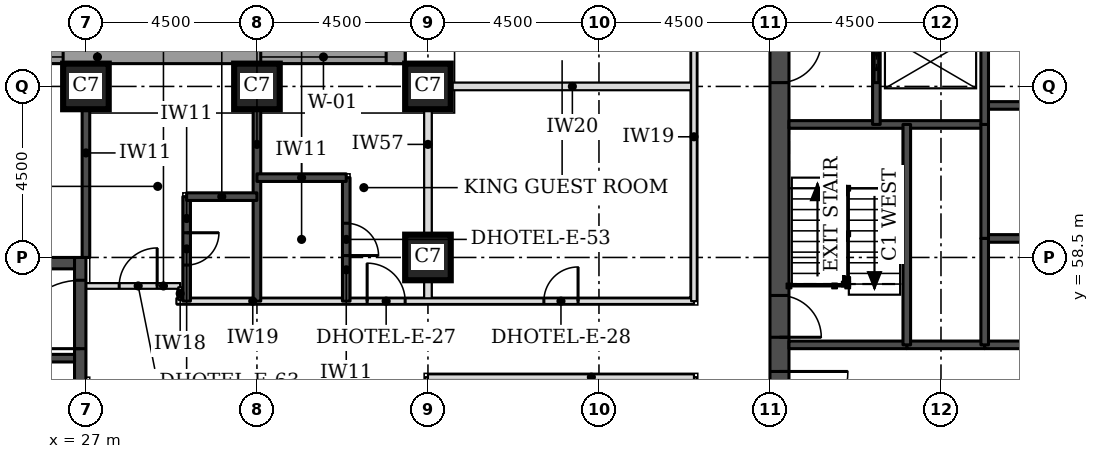
"""IFC4 building model, lengths in metres.
Left out: names, types, materials, properties, quantities, classifications, styles, units other than length and angle.
Written with IfcOpenShell. Run it as: python <this file> out.ifc"""

import sys

from ifc_helpers import new_model, si_unit, direction, frame, frame_2d, origin, origin_2d, place, context, subcontext, project, spatial, rectangle, extrude, element, fill, save


model = new_model("IFC4")
c1 = context("Model", 3, precision=1e-05, world=origin(), true_north=direction((0.0, 1.0)))
c2 = subcontext(c1, "Body", "Model", "MODEL_VIEW")
j1 = project(units=[si_unit("LENGTHUNIT", "METRE"), si_unit("PLANEANGLEUNIT", "RADIAN")], contexts=[c1])
p1 = place(None, origin())
s1 = spatial("IfcSite", under=j1, at=p1, CompositionType="ELEMENT")
p2 = place(p1, origin())
s2 = spatial("IfcBuilding", under=s1, at=p2, CompositionType="ELEMENT")
p3 = place(p2, frame((0.0, 0.0, 39.6)))
s3 = spatial("IfcBuildingStorey", under=s2, at=p3, CompositionType="ELEMENT", Elevation=39.6)
for number, where, z_axis, x_axis in (
    (1, (36.0, 58.5, 0.0), (0.0, 0.0, 1.0), (1.0, 0.0, 0.0)),
    (2, (27.0, 63.0, 0.0), (0.0, 0.0, 1.0), (1.0, 0.0, 0.0)),
    (3, (31.5, 63.0, 0.0), (0.0, 0.0, 1.0), (1.0, 0.0, 0.0)),
    (4, (36.0, 63.0, 0.0), (0.0, 0.0, 1.0), (1.0, 0.0, 0.0)),
):
    element("IfcColumn", number, at=place(p3, frame(where, z_axis=z_axis, x_axis=x_axis)), inside=s3, PredefinedType="COLUMN", context=c2, shape_type="SweptSolid", body=[
        extrude(rectangle(XDim=1.2, YDim=1.2, at=origin_2d()), origin(), (0.0, 0.0, 1.0), 3.3),
    ])
p4 = place(p3, frame((45.25, 49.5, 0.0), z_axis=(0.0, 0.0, 1.0), x_axis=(0.0, 1.0, 0.0)))
e5 = element("IfcWall", 5, at=p4, inside=s3, PredefinedType="SHEAR", context=c2, shape_type="SweptSolid", body=[
    extrude(rectangle(XDim=22.5, YDim=0.5, at=frame_2d((11.25, 0.0))), origin(), (0.0, 0.0, 1.0), 3.3),
])
p5 = place(p4, frame((4.2, 0.0, 0.0)))
e6 = element("IfcOpeningElement", 6, at=p5, cuts=e5, PredefinedType="OPENING", context=c2, shape_type="SweptSolid", body=[
    extrude(rectangle(XDim=1.8, YDim=2.1, at=frame_2d((0.9, 1.05))), frame((0.0, 0.26, 0.0), z_axis=(0.0, -1.0, 0.0), x_axis=(1.0, 0.0, 0.0)), (0.0, 0.0, 1.0), 0.52),
])
p6 = place(p4, frame((6.9, 0.0, 0.0)))
e7 = element("IfcOpeningElement", 7, at=p6, cuts=e5, PredefinedType="OPENING", context=c2, shape_type="SweptSolid", body=[
    extrude(rectangle(XDim=1.1, YDim=2.1, at=frame_2d((0.55, 1.05))), frame((0.0, 0.26, 0.0), z_axis=(0.0, -1.0, 0.0), x_axis=(1.0, 0.0, 0.0)), (0.0, 0.0, 1.0), 0.52),
])
p7 = place(p4, frame((13.6, 0.0, 0.0)))
e8 = element("IfcOpeningElement", 8, at=p7, cuts=e5, PredefinedType="OPENING", context=c2, shape_type="SweptSolid", body=[
    extrude(rectangle(XDim=1.1, YDim=2.1, at=frame_2d((0.55, 1.05))), frame((0.0, 0.26, 0.0), z_axis=(0.0, -1.0, 0.0), x_axis=(1.0, 0.0, 0.0)), (0.0, 0.0, 1.0), 0.52),
])
p8 = place(p4, frame((16.5, 0.0, 0.0)))
e9 = element("IfcOpeningElement", 9, at=p8, cuts=e5, PredefinedType="OPENING", context=c2, shape_type="SweptSolid", body=[
    extrude(rectangle(XDim=1.8, YDim=2.1, at=frame_2d((0.9, 1.05))), frame((0.0, 0.26, 0.0), z_axis=(0.0, -1.0, 0.0), x_axis=(1.0, 0.0, 0.0)), (0.0, 0.0, 1.0), 0.52),
])
p9 = place(p3, frame((18.3, 58.35, 0.0), z_axis=(0.0, 0.0, 1.0), x_axis=(1.0, 0.0, 0.0)))
e10 = element("IfcWall", 10, at=p9, inside=s3, PredefinedType="SHEAR", context=c2, shape_type="SweptSolid", body=[
    extrude(rectangle(XDim=8.4, YDim=0.3, at=frame_2d((4.2, 0.0))), origin(), (0.0, 0.0, 1.0), 3.3),
])
p10 = place(p3, frame((26.85, 49.5, 0.0), z_axis=(0.0, 0.0, 1.0), x_axis=(0.0, 1.0, 0.0)))
e11 = element("IfcWall", 11, at=p10, inside=s3, PredefinedType="SHEAR", context=c2, shape_type="SweptSolid", body=[
    extrude(rectangle(XDim=9.0, YDim=0.3, at=frame_2d((4.5, 0.0))), origin(), (0.0, 0.0, 1.0), 3.3),
])
p11 = place(p10, frame((6.6, 0.0, 0.0)))
e12 = element("IfcOpeningElement", 12, at=p11, cuts=e11, PredefinedType="OPENING", context=c2, shape_type="SweptSolid", body=[
    extrude(rectangle(XDim=1.8, YDim=2.1, at=frame_2d((0.9, 1.05))), frame((0.0, 0.16, 0.0), z_axis=(0.0, -1.0, 0.0), x_axis=(1.0, 0.0, 0.0)), (0.0, 0.0, 1.0), 0.32),
])
p12 = place(p3, frame((35.225, 76.894, 0.0), z_axis=(0.0, 0.0, 1.0), x_axis=(0.0, -1.0, 0.0)))
e13 = element("IfcWall", 13, at=p12, inside=s3, PredefinedType="STANDARD", context=c2, shape_type="SweptSolid", body=[
    extrude(rectangle(XDim=13.293, YDim=0.35, at=frame_2d((6.647, 0.0))), origin(), (0.0, 0.0, 1.0), 3.055),
])
p13 = place(p12, frame((9.493, 0.0, 0.8)))
e14 = element("IfcOpeningElement", 14, at=p13, cuts=e13, PredefinedType="OPENING", context=c2, shape_type="SweptSolid", body=[
    extrude(rectangle(XDim=3.3, YDim=1.5, at=frame_2d((1.65, 0.75))), frame((0.0, 0.185, 0.0), z_axis=(0.0, -1.0, 0.0), x_axis=(1.0, 0.0, 0.0)), (0.0, 0.0, 1.0), 0.37),
])
p14 = place(p3, frame((35.4, 63.775, 0.0), z_axis=(0.0, 0.0, 1.0), x_axis=(-1.0, 0.0, 0.0)))
e15 = element("IfcWall", 15, at=p14, inside=s3, PredefinedType="STANDARD", context=c2, shape_type="SweptSolid", body=[
    extrude(rectangle(XDim=17.793, YDim=0.35, at=frame_2d((8.897, 0.0))), origin(), (0.0, 0.0, 1.0), 3.055),
])
p15 = place(p14, frame((0.5, 0.0, 0.8)))
e16 = element("IfcOpeningElement", 16, at=p15, cuts=e15, PredefinedType="OPENING", context=c2, shape_type="SweptSolid", body=[
    extrude(rectangle(XDim=3.3, YDim=1.5, at=frame_2d((1.65, 0.75))), frame((0.0, 0.185, 0.0), z_axis=(0.0, -1.0, 0.0), x_axis=(1.0, 0.0, 0.0)), (0.0, 0.0, 1.0), 0.37),
])
p16 = place(p14, frame((9.0, 0.0, 0.8)))
e17 = element("IfcOpeningElement", 17, at=p16, cuts=e15, PredefinedType="OPENING", context=c2, shape_type="SweptSolid", body=[
    extrude(rectangle(XDim=3.3, YDim=1.5, at=frame_2d((1.65, 0.75))), frame((0.0, 0.185, 0.0), z_axis=(0.0, -1.0, 0.0), x_axis=(1.0, 0.0, 0.0)), (0.0, 0.0, 1.0), 0.37),
])
p17 = place(p3, frame((36.0, 57.35, 0.0), z_axis=(0.0, 0.0, 1.0), x_axis=(0.0, 1.0, 0.0)))
e18 = element("IfcWall", 18, at=p17, inside=s3, PredefinedType="PARTITIONING", context=c2, shape_type="SweptSolid", body=[
    extrude(rectangle(XDim=5.05, YDim=0.2, at=frame_2d((2.525, 0.0))), origin(), (0.0, 0.0, 1.0), 2.33),
])
p18 = place(p3, frame((36.6, 63.0, 0.0), z_axis=(0.0, 0.0, 1.0), x_axis=(1.0, 0.0, 0.0)))
e19 = element("IfcWall", 19, at=p18, inside=s3, PredefinedType="PARTITIONING", context=c2, shape_type="SweptSolid", body=[
    extrude(rectangle(XDim=6.4, YDim=0.2, at=frame_2d((3.2, 0.0))), origin(), (0.0, 0.0, 1.0), 3.08),
])
p19 = place(p3, frame((43.0, 47.5, 0.0), z_axis=(0.0, 0.0, 1.0), x_axis=(0.0, 1.0, 0.0)))
e20 = element("IfcWall", 20, at=p19, inside=s3, PredefinedType="PARTITIONING", context=c2, shape_type="SweptSolid", body=[
    extrude(rectangle(XDim=7.85, YDim=0.15, at=frame_2d((3.925, 0.0))), origin(), (0.0, 0.0, 1.0), 3.08),
])
p20 = place(p19, frame((3.475, 0.0, 0.0)))
e21 = element("IfcOpeningElement", 21, at=p20, cuts=e20, PredefinedType="OPENING", context=c2, shape_type="SweptSolid", body=[
    extrude(rectangle(XDim=0.9, YDim=2.1, at=frame_2d((0.45, 1.05))), frame((0.0, 0.085, 0.0), z_axis=(0.0, -1.0, 0.0), x_axis=(1.0, 0.0, 0.0)), (0.0, 0.0, 1.0), 0.17),
])
p21 = place(p3, frame((36.0, 54.05, 0.0), z_axis=(0.0, 0.0, 1.0), x_axis=(0.0, 1.0, 0.0)))
e22 = element("IfcWall", 22, at=p21, inside=s3, PredefinedType="PARTITIONING", context=c2, shape_type="SweptSolid", body=[
    extrude(rectangle(XDim=1.3, YDim=0.15, at=frame_2d((0.65, 0.0))), origin(), (0.0, 0.0, 1.0), 2.33),
])
p22 = place(p3, frame((36.0, 55.35, 0.0), z_axis=(0.0, 0.0, 1.0), x_axis=(1.0, 0.0, 0.0)))
e23 = element("IfcWall", 23, at=p22, inside=s3, PredefinedType="PARTITIONING", context=c2, shape_type="SweptSolid", body=[
    extrude(rectangle(XDim=7.0, YDim=0.15, at=frame_2d((3.5, 0.0))), origin(), (0.0, 0.0, 1.0), 3.08),
])
p23 = place(p3, frame((29.38, 57.35, 0.0), z_axis=(0.0, 0.0, 1.0), x_axis=(1.0, 0.0, 0.0)))
e24 = element("IfcWall", 24, at=p23, inside=s3, PredefinedType="PARTITIONING", context=c2, shape_type="SweptSolid", body=[
    extrude(rectangle(XDim=13.62, YDim=0.15, at=frame_2d((6.81, 0.0))), origin(), (0.0, 0.0, 1.0), 3.08),
])
p24 = place(p23, frame((5.02, 0.0, 0.0)))
e25 = element("IfcOpeningElement", 25, at=p24, cuts=e24, PredefinedType="OPENING", context=c2, shape_type="SweptSolid", body=[
    extrude(rectangle(XDim=1.0, YDim=2.1, at=frame_2d((0.5, 1.05))), frame((0.0, 0.085, 0.0), z_axis=(0.0, -1.0, 0.0), x_axis=(1.0, 0.0, 0.0)), (0.0, 0.0, 1.0), 0.17),
])
p25 = place(p23, frame((9.67, 0.0, 0.0)))
e26 = element("IfcOpeningElement", 26, at=p25, cuts=e24, PredefinedType="OPENING", context=c2, shape_type="SweptSolid", body=[
    extrude(rectangle(XDim=0.9, YDim=2.1, at=frame_2d((0.45, 1.05))), frame((0.0, 0.085, 0.0), z_axis=(0.0, -1.0, 0.0), x_axis=(1.0, 0.0, 0.0)), (0.0, 0.0, 1.0), 0.17),
])
p26 = place(p3, frame((43.0, 57.35, 0.0), z_axis=(0.0, 0.0, 1.0), x_axis=(0.0, 1.0, 0.0)))
e27 = element("IfcWall", 27, at=p26, inside=s3, PredefinedType="PARTITIONING", context=c2, shape_type="SweptSolid", body=[
    extrude(rectangle(XDim=16.65, YDim=0.15, at=frame_2d((8.325, 0.0))), origin(), (0.0, 0.0, 1.0), 3.08),
])
p27 = place(p26, frame((8.425, 0.0, 0.0)))
e28 = element("IfcOpeningElement", 28, at=p27, cuts=e27, PredefinedType="OPENING", context=c2, shape_type="SweptSolid", body=[
    extrude(rectangle(XDim=1.0, YDim=2.1, at=frame_2d((0.5, 1.05))), frame((0.0, 0.085, 0.0), z_axis=(0.0, -1.0, 0.0), x_axis=(1.0, 0.0, 0.0)), (0.0, 0.0, 1.0), 0.17),
])
p28 = place(p26, frame((15.203, 0.0, 0.0)))
e29 = element("IfcOpeningElement", 29, at=p28, cuts=e27, PredefinedType="OPENING", context=c2, shape_type="SweptSolid", body=[
    extrude(rectangle(XDim=1.0, YDim=2.1, at=frame_2d((0.5, 1.05))), frame((0.0, 0.085, 0.0), z_axis=(0.0, -1.0, 0.0), x_axis=(1.0, 0.0, 0.0)), (0.0, 0.0, 1.0), 0.17),
])
p29 = place(p3, frame((27.0, 58.5, 0.0), z_axis=(0.0, 0.0, 1.0), x_axis=(0.0, 1.0, 0.0)))
e30 = element("IfcWall", 30, at=p29, inside=s3, PredefinedType="SOLIDWALL", context=c2, shape_type="SweptSolid", body=[
    extrude(rectangle(XDim=3.9, YDim=0.2, at=frame_2d((1.95, 0.0))), origin(), (0.0, 0.0, 1.0), 3.08),
])
p30 = place(p3, frame((29.65, 57.35, 0.0), z_axis=(0.0, 0.0, 1.0), x_axis=(0.0, 1.0, 0.0)))
e31 = element("IfcWall", 31, at=p30, inside=s3, PredefinedType="SOLIDWALL", context=c2, shape_type="SweptSolid", body=[
    extrude(rectangle(XDim=2.75, YDim=0.2, at=frame_2d((1.375, 0.0))), origin(), (0.0, 0.0, 1.0), 3.08),
])
p31 = place(p30, frame((0.95, 0.0, 0.0)))
e32 = element("IfcOpeningElement", 32, at=p31, cuts=e31, PredefinedType="OPENING", context=c2, shape_type="SweptSolid", body=[
    extrude(rectangle(XDim=0.85, YDim=2.1, at=frame_2d((0.425, 1.05))), frame((0.0, 0.11, 0.0), z_axis=(0.0, -1.0, 0.0), x_axis=(1.0, 0.0, 0.0)), (0.0, 0.0, 1.0), 0.22),
])
p32 = place(p3, frame((31.5, 57.35, 0.0), z_axis=(0.0, 0.0, 1.0), x_axis=(0.0, 1.0, 0.0)))
e33 = element("IfcWall", 33, at=p32, inside=s3, PredefinedType="SOLIDWALL", context=c2, shape_type="SweptSolid", body=[
    extrude(rectangle(XDim=5.05, YDim=0.2, at=frame_2d((2.525, 0.0))), origin(), (0.0, 0.0, 1.0), 3.08),
])
p33 = place(p3, frame((33.85, 57.35, 0.0), z_axis=(0.0, 0.0, 1.0), x_axis=(0.0, 1.0, 0.0)))
e34 = element("IfcWall", 34, at=p33, inside=s3, PredefinedType="SOLIDWALL", context=c2, shape_type="SweptSolid", body=[
    extrude(rectangle(XDim=3.25, YDim=0.2, at=frame_2d((1.625, 0.0))), origin(), (0.0, 0.0, 1.0), 3.08),
])
p34 = place(p33, frame((1.2, 0.0, 0.0)))
e35 = element("IfcOpeningElement", 35, at=p34, cuts=e34, PredefinedType="OPENING", context=c2, shape_type="SweptSolid", body=[
    extrude(rectangle(XDim=0.85, YDim=2.1, at=frame_2d((0.425, 1.05))), frame((0.0, 0.11, 0.0), z_axis=(0.0, -1.0, 0.0), x_axis=(1.0, 0.0, 0.0)), (0.0, 0.0, 1.0), 0.22),
])
p35 = place(p3, frame((29.65, 60.1, 0.0), z_axis=(0.0, 0.0, 1.0), x_axis=(1.0, 0.0, 0.0)))
e36 = element("IfcWall", 36, at=p35, inside=s3, PredefinedType="SOLIDWALL", context=c2, shape_type="SweptSolid", body=[
    extrude(rectangle(XDim=1.85, YDim=0.2, at=frame_2d((0.925, 0.0))), origin(), (0.0, 0.0, 1.0), 3.08),
])
p36 = place(p3, frame((31.5, 60.6, 0.0), z_axis=(0.0, 0.0, 1.0), x_axis=(1.0, 0.0, 0.0)))
e37 = element("IfcWall", 37, at=p36, inside=s3, PredefinedType="SOLIDWALL", context=c2, shape_type="SweptSolid", body=[
    extrude(rectangle(XDim=2.35, YDim=0.2, at=frame_2d((1.175, 0.0))), origin(), (0.0, 0.0, 1.0), 3.08),
])
p37 = place(p3, frame((27.0, 57.75, 0.0), z_axis=(0.0, 0.0, 1.0), x_axis=(1.0, 0.0, 0.0)))
e38 = element("IfcWall", 38, at=p37, inside=s3, PredefinedType="PARTITIONING", context=c2, shape_type="SweptSolid", body=[
    extrude(rectangle(XDim=2.48, YDim=0.15, at=frame_2d((1.24, 0.0))), origin(), (0.0, 0.0, 1.0), 3.08),
])
p38 = place(p37, frame((0.875, 0.0, 0.0)))
e39 = element("IfcOpeningElement", 39, at=p38, cuts=e38, PredefinedType="OPENING", context=c2, shape_type="SweptSolid", body=[
    extrude(rectangle(XDim=1.0, YDim=2.1, at=frame_2d((0.5, 1.05))), frame((0.0, 0.085, 0.0), z_axis=(0.0, -1.0, 0.0), x_axis=(1.0, 0.0, 0.0)), (0.0, 0.0, 1.0), 0.17),
])
p39 = place(p3, frame((29.48, 57.385, 0.0), z_axis=(0.0, 0.0, 1.0), x_axis=(0.0, 1.0, 0.0)))
e40 = element("IfcWall", 40, at=p39, inside=s3, PredefinedType="PARTITIONING", context=c2, shape_type="SweptSolid", body=[
    extrude(rectangle(XDim=0.33, YDim=0.1, at=frame_2d((0.165, 0.0))), origin(), (0.0, 0.0, 1.0), 3.08),
])
p40 = place(p3, frame((48.6, 56.2, 0.0), z_axis=(0.0, 0.0, 1.0), x_axis=(1.0, 0.0, 0.0)))
e41 = element("IfcWall", 41, at=p40, inside=s3, PredefinedType="SOLIDWALL", context=c2, shape_type="SweptSolid", body=[
    extrude(rectangle(XDim=2.05, YDim=0.2, at=frame_2d((1.025, 0.0))), origin(), (0.0, 0.0, 1.0), 3.08),
])
p41 = place(p3, frame((45.5, 56.2, 0.0), z_axis=(0.0, 0.0, 1.0), x_axis=(1.0, 0.0, 0.0)))
e42 = element("IfcWall", 42, at=p41, inside=s3, PredefinedType="SOLIDWALL", context=c2, shape_type="SweptSolid", body=[
    extrude(rectangle(XDim=3.1, YDim=0.2, at=frame_2d((1.55, 0.0))), origin(), (0.0, 0.0, 1.0), 3.08),
])
p42 = place(p3, frame((50.65, 56.2, 0.0), z_axis=(0.0, 0.0, 1.0), x_axis=(1.0, 0.0, 0.0)))
e43 = element("IfcWall", 43, at=p42, inside=s3, PredefinedType="SOLIDWALL", context=c2, shape_type="SweptSolid", body=[
    extrude(rectangle(XDim=11.2, YDim=0.2, at=frame_2d((5.6, 0.0))), origin(), (0.0, 0.0, 1.0), 3.08),
])
p43 = place(p3, frame((50.65, 59.0, 0.0), z_axis=(0.0, 0.0, 1.0), x_axis=(1.0, 0.0, 0.0)))
e44 = element("IfcWall", 44, at=p43, inside=s3, PredefinedType="SOLIDWALL", context=c2, shape_type="SweptSolid", body=[
    extrude(rectangle(XDim=11.2, YDim=0.2, at=frame_2d((5.6, 0.0))), origin(), (0.0, 0.0, 1.0), 3.3),
])
p44 = place(p3, frame((45.5, 62.0, 0.0), z_axis=(0.0, 0.0, 1.0), x_axis=(1.0, 0.0, 0.0)))
e45 = element("IfcWall", 45, at=p44, inside=s3, PredefinedType="SOLIDWALL", context=c2, shape_type="SweptSolid", body=[
    extrude(rectangle(XDim=5.15, YDim=0.2, at=frame_2d((2.575, 0.0))), origin(), (0.0, 0.0, 1.0), 3.08),
])
p45 = place(p3, frame((50.65, 62.5, 0.0), z_axis=(0.0, 0.0, 1.0), x_axis=(1.0, 0.0, 0.0)))
e46 = element("IfcWall", 46, at=p45, inside=s3, PredefinedType="SOLIDWALL", context=c2, shape_type="SweptSolid", body=[
    extrude(rectangle(XDim=11.2, YDim=0.2, at=frame_2d((5.6, 0.0))), origin(), (0.0, 0.0, 1.0), 3.3),
])
p46 = place(p3, frame((47.8, 62.0, 0.0), z_axis=(0.0, 0.0, 1.0), x_axis=(0.0, 1.0, 0.0)))
e47 = element("IfcWall", 47, at=p46, inside=s3, PredefinedType="SOLIDWALL", context=c2, shape_type="SweptSolid", body=[
    extrude(rectangle(XDim=3.3, YDim=0.2, at=frame_2d((1.65, 0.0))), origin(), (0.0, 0.0, 1.0), 3.08),
])
p47 = place(p46, frame((1.1, 0.0, 0.0)))
e48 = element("IfcOpeningElement", 48, at=p47, cuts=e47, PredefinedType="OPENING", context=c2, shape_type="SweptSolid", body=[
    extrude(rectangle(XDim=1.1, YDim=2.1, at=frame_2d((0.55, 1.05))), frame((0.0, 0.11, 0.0), z_axis=(0.0, -1.0, 0.0), x_axis=(1.0, 0.0, 0.0)), (0.0, 0.0, 1.0), 0.22),
])
p48 = place(p3, frame((48.6, 56.2, 0.0), z_axis=(0.0, 0.0, 1.0), x_axis=(0.0, 1.0, 0.0)))
e49 = element("IfcWall", 49, at=p48, inside=s3, PredefinedType="SOLIDWALL", context=c2, shape_type="SweptSolid", body=[
    extrude(rectangle(XDim=5.8, YDim=0.2, at=frame_2d((2.9, 0.0))), origin(), (0.0, 0.0, 1.0), 3.08),
])
p49 = place(p3, frame((50.65, 59.0, 0.0), z_axis=(0.0, 0.0, 1.0), x_axis=(0.0, 1.0, 0.0)))
e50 = element("IfcWall", 50, at=p49, inside=s3, PredefinedType="SOLIDWALL", context=c2, shape_type="SweptSolid", body=[
    extrude(rectangle(XDim=3.0, YDim=0.2, at=frame_2d((1.5, 0.0))), origin(), (0.0, 0.0, 1.0), 3.3),
])
p50 = place(p3, frame((50.65, 56.2, 0.0), z_axis=(0.0, 0.0, 1.0), x_axis=(0.0, 1.0, 0.0)))
e51 = element("IfcWall", 51, at=p50, inside=s3, PredefinedType="SOLIDWALL", context=c2, shape_type="SweptSolid", body=[
    extrude(rectangle(XDim=2.8, YDim=0.2, at=frame_2d((1.4, 0.0))), origin(), (0.0, 0.0, 1.0), 3.08),
])
p51 = place(p3, frame((50.65, 62.0, 0.0), z_axis=(0.0, 0.0, 1.0), x_axis=(0.0, 1.0, 0.0)))
e52 = element("IfcWall", 52, at=p51, inside=s3, PredefinedType="SOLIDWALL", context=c2, shape_type="SweptSolid", body=[
    extrude(rectangle(XDim=3.3, YDim=0.2, at=frame_2d((1.65, 0.0))), origin(), (0.0, 0.0, 1.0), 3.08),
])
p52 = place(p3, frame((23.2, 55.85, 0.0), z_axis=(0.0, 0.0, 1.0), x_axis=(1.0, 0.0, 0.0)))
e53 = element("IfcWall", 53, at=p52, inside=s3, PredefinedType="SOLIDWALL", context=c2, shape_type="SweptSolid", body=[
    extrude(rectangle(XDim=3.5, YDim=0.2, at=frame_2d((1.75, 0.0))), origin(), (0.0, 0.0, 1.0), 3.08),
])
p53 = place(p52, frame((1.2, 0.0, 0.0)))
e54 = element("IfcOpeningElement", 54, at=p53, cuts=e53, PredefinedType="OPENING", context=c2, shape_type="SweptSolid", body=[
    extrude(rectangle(XDim=1.1, YDim=2.1, at=frame_2d((0.55, 1.05))), frame((0.0, 0.11, 0.0), z_axis=(0.0, -1.0, 0.0), x_axis=(1.0, 0.0, 0.0)), (0.0, 0.0, 1.0), 0.22),
])
p54 = place(p15, origin())
e55 = element("IfcWindow", 55, at=p54, inside=s3, PartitioningType="SINGLE_PANEL", PredefinedType="WINDOW", context=c2, shape_type="SweptSolid", body=[
    extrude(rectangle(XDim=3.3, YDim=1.5, at=frame_2d((1.65, 0.75))), frame((0.0, 0.085, 0.0), z_axis=(0.0, -1.0, 0.0), x_axis=(1.0, 0.0, 0.0)), (0.0, 0.0, 1.0), 0.06),
])
fill(e16, e55)
p55 = place(p16, origin())
e56 = element("IfcWindow", 56, at=p55, inside=s3, PartitioningType="SINGLE_PANEL", PredefinedType="WINDOW", context=c2, shape_type="SweptSolid", body=[
    extrude(rectangle(XDim=3.3, YDim=1.5, at=frame_2d((1.65, 0.75))), frame((0.0, 0.085, 0.0), z_axis=(0.0, -1.0, 0.0), x_axis=(1.0, 0.0, 0.0)), (0.0, 0.0, 1.0), 0.06),
])
fill(e17, e56)
p56 = place(p24, origin())
e57 = element("IfcDoor", 57, at=p56, inside=s3, OperationType="SINGLE_SWING_LEFT", PredefinedType="DOOR", context=c2, shape_type="SweptSolid", body=[
    extrude(rectangle(XDim=1.0, YDim=2.1, at=frame_2d((0.5, 1.05))), frame((0.0, 0.025, 0.0), z_axis=(0.0, -1.0, 0.0), x_axis=(1.0, 0.0, 0.0)), (0.0, 0.0, 1.0), 0.05),
])
fill(e25, e57)
p57 = place(p34, frame((0.85, 0.0, 0.0), z_axis=(0.0, 0.0, 1.0), x_axis=(-1.0, 0.0, 0.0)))
e58 = element("IfcDoor", 58, at=p57, inside=s3, OperationType="SINGLE_SWING_RIGHT", PredefinedType="DOOR", context=c2, shape_type="SweptSolid", body=[
    extrude(rectangle(XDim=0.85, YDim=2.1, at=frame_2d((0.425, 1.05))), frame((0.0, 0.025, 0.0), z_axis=(0.0, -1.0, 0.0), x_axis=(1.0, 0.0, 0.0)), (0.0, 0.0, 1.0), 0.05),
])
fill(e35, e58)
p58 = place(p31, frame((0.85, 0.0, 0.0), z_axis=(0.0, 0.0, 1.0), x_axis=(-1.0, 0.0, 0.0)))
e59 = element("IfcDoor", 59, at=p58, inside=s3, OperationType="SINGLE_SWING_LEFT", PredefinedType="DOOR", context=c2, shape_type="SweptSolid", body=[
    extrude(rectangle(XDim=0.85, YDim=2.1, at=frame_2d((0.425, 1.05))), frame((0.0, 0.025, 0.0), z_axis=(0.0, -1.0, 0.0), x_axis=(1.0, 0.0, 0.0)), (0.0, 0.0, 1.0), 0.05),
])
fill(e32, e59)
p59 = place(p25, origin())
e60 = element("IfcDoor", 60, at=p59, inside=s3, OperationType="SINGLE_SWING_RIGHT", PredefinedType="DOOR", context=c2, shape_type="SweptSolid", body=[
    extrude(rectangle(XDim=0.9, YDim=2.1, at=frame_2d((0.45, 1.05))), frame((0.0, 0.025, 0.0), z_axis=(0.0, -1.0, 0.0), x_axis=(1.0, 0.0, 0.0)), (0.0, 0.0, 1.0), 0.05),
])
fill(e26, e60)
p60 = place(p38, origin())
e61 = element("IfcDoor", 61, at=p60, inside=s3, OperationType="SINGLE_SWING_RIGHT", PredefinedType="DOOR", context=c2, shape_type="SweptSolid", body=[
    extrude(rectangle(XDim=1.0, YDim=2.1, at=frame_2d((0.5, 1.05))), frame((0.0, 0.025, 0.0), z_axis=(0.0, -1.0, 0.0), x_axis=(1.0, 0.0, 0.0)), (0.0, 0.0, 1.0), 0.05),
])
fill(e39, e61)
p61 = place(p47, origin())
e62 = element("IfcDoor", 62, at=p61, inside=s3, OperationType="DOUBLE_DOOR_SLIDING", PredefinedType="DOOR", context=c2, shape_type="SweptSolid", body=[
    extrude(rectangle(XDim=1.1, YDim=2.1, at=frame_2d((0.55, 1.05))), frame((0.0, 0.025, 0.0), z_axis=(0.0, -1.0, 0.0), x_axis=(1.0, 0.0, 0.0)), (0.0, 0.0, 1.0), 0.05),
])
fill(e48, e62)
p62 = place(p5, frame((1.8, 0.0, 0.0), z_axis=(0.0, 0.0, 1.0), x_axis=(-1.0, 0.0, 0.0)))
e63 = element("IfcDoor", 63, at=p62, inside=s3, OperationType="SINGLE_SWING_LEFT", PredefinedType="DOOR", context=c2, shape_type="SweptSolid", body=[
    extrude(rectangle(XDim=1.8, YDim=2.1, at=frame_2d((0.9, 1.05))), frame((0.0, 0.025, 0.0), z_axis=(0.0, -1.0, 0.0), x_axis=(1.0, 0.0, 0.0)), (0.0, 0.0, 1.0), 0.05),
])
fill(e6, e63)
p63 = place(p6, frame((1.1, 0.0, 0.0), z_axis=(0.0, 0.0, 1.0), x_axis=(-1.0, 0.0, 0.0)))
e64 = element("IfcDoor", 64, at=p63, inside=s3, OperationType="SINGLE_SWING_RIGHT", PredefinedType="DOOR", context=c2, shape_type="SweptSolid", body=[
    extrude(rectangle(XDim=1.1, YDim=2.1, at=frame_2d((0.55, 1.05))), frame((0.0, 0.025, 0.0), z_axis=(0.0, -1.0, 0.0), x_axis=(1.0, 0.0, 0.0)), (0.0, 0.0, 1.0), 0.05),
])
fill(e7, e64)
p64 = place(p7, frame((1.1, 0.0, 0.0), z_axis=(0.0, 0.0, 1.0), x_axis=(-1.0, 0.0, 0.0)))
e65 = element("IfcDoor", 65, at=p64, inside=s3, OperationType="SINGLE_SWING_LEFT", PredefinedType="DOOR", context=c2, shape_type="SweptSolid", body=[
    extrude(rectangle(XDim=1.1, YDim=2.1, at=frame_2d((0.55, 1.05))), frame((0.0, 0.025, 0.0), z_axis=(0.0, -1.0, 0.0), x_axis=(1.0, 0.0, 0.0)), (0.0, 0.0, 1.0), 0.05),
])
fill(e8, e65)
p65 = place(p11, origin())
e66 = element("IfcDoor", 66, at=p65, inside=s3, OperationType="SINGLE_SWING_LEFT", PredefinedType="DOOR", context=c2, shape_type="SweptSolid", body=[
    extrude(rectangle(XDim=1.8, YDim=2.1, at=frame_2d((0.9, 1.05))), frame((0.0, 0.025, 0.0), z_axis=(0.0, -1.0, 0.0), x_axis=(1.0, 0.0, 0.0)), (0.0, 0.0, 1.0), 0.05),
])
fill(e12, e66)
save(model, sys.argv[1])
